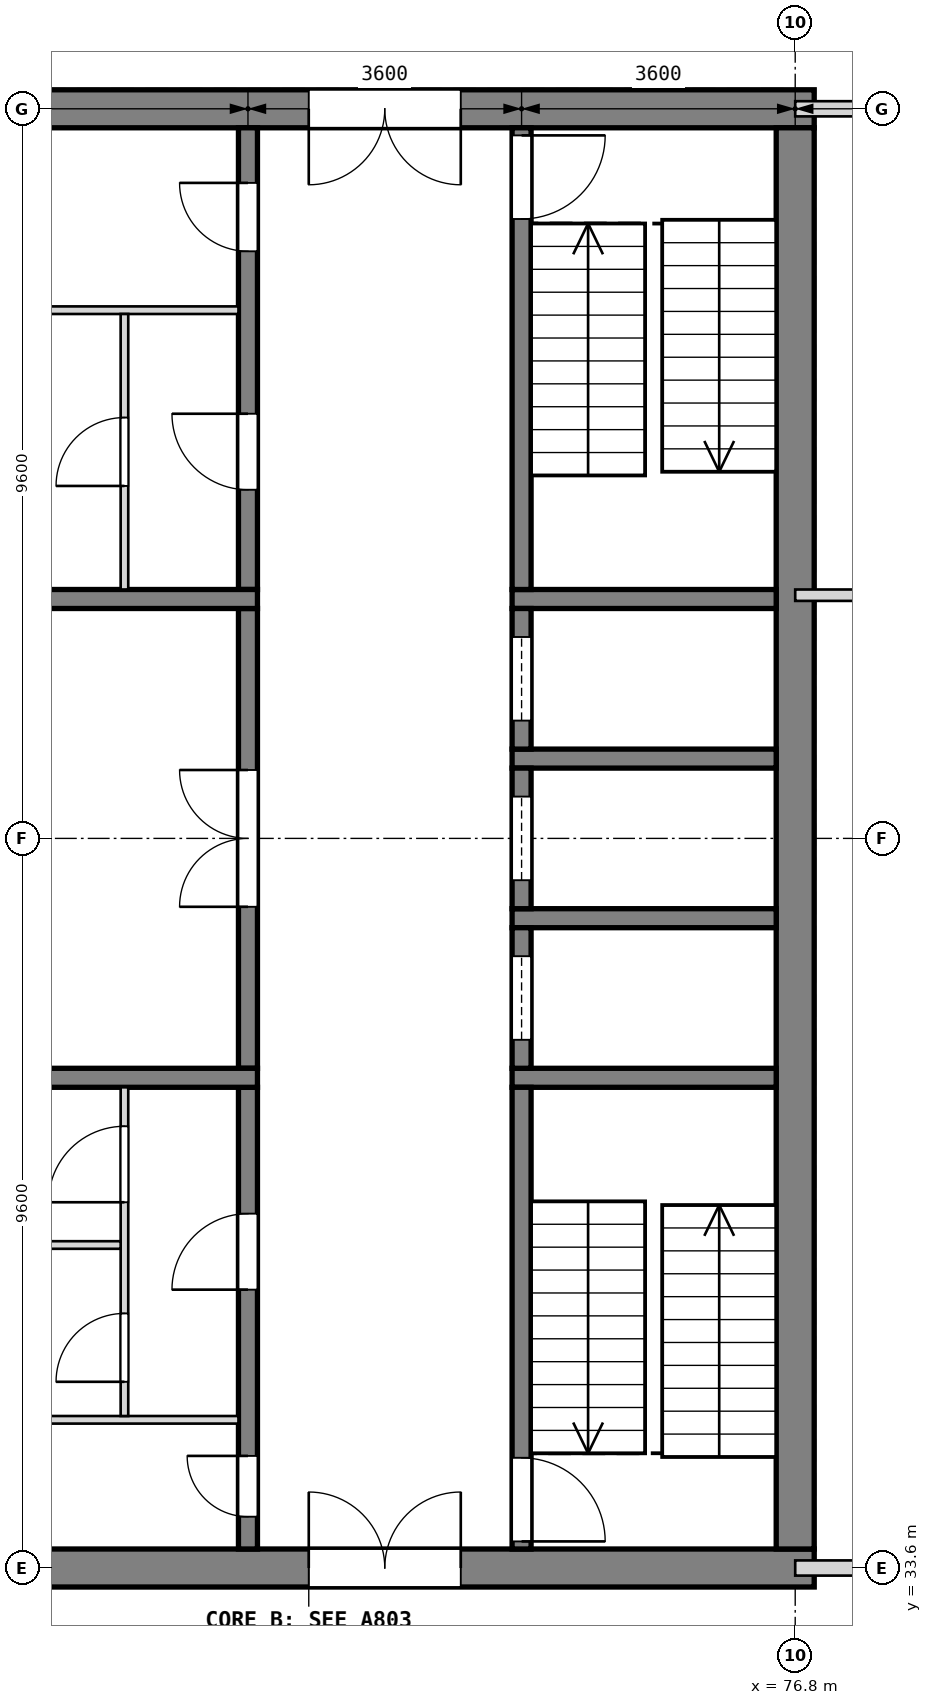
"""IFC4 building model, lengths in metres.
Left out: names, types, materials, properties, quantities, classifications, styles, units other than length and angle.
Written with IfcOpenShell. Run it as: python <this file> out.ifc"""

import sys

from ifc_helpers import new_model, si_unit, direction, frame, frame_2d, origin, place, context, subcontext, project, spatial, rectangle, extrude, element, fill, save


model = new_model("IFC4")
c1 = context("Model", 3, precision=1e-05, world=origin(), true_north=direction((0.0, 1.0)))
c2 = subcontext(c1, "Body", "Model", "MODEL_VIEW")
j1 = project(units=[si_unit("LENGTHUNIT", "METRE"), si_unit("PLANEANGLEUNIT", "RADIAN")], contexts=[c1])
p1 = place(None, origin())
s1 = spatial("IfcSite", under=j1, at=p1, CompositionType="ELEMENT")
p2 = place(p1, origin())
s2 = spatial("IfcBuilding", under=s1, at=p2, CompositionType="ELEMENT")
p3 = place(p2, frame((0.0, 0.0, 4.2)))
s3 = spatial("IfcBuildingStorey", under=s2, at=p3, CompositionType="ELEMENT", Elevation=4.2)
p4 = place(p3, frame((63.75, 52.8, 0.0), z_axis=(0.0, 0.0, 1.0), x_axis=(1.0, 0.0, 0.0)))
e1 = element("IfcWall", 1, at=p4, inside=s3, PredefinedType="SHEAR", context=c2, shape_type="SweptSolid", body=[
    extrude(rectangle(XDim=13.3, YDim=0.5, at=frame_2d((6.65, 0.0))), origin(), (0.0, 0.0, 1.0), 4.2),
])
p5 = place(p4, frame((6.65, 0.0, 0.0)))
e2 = element("IfcOpeningElement", 2, at=p5, cuts=e1, PredefinedType="OPENING", context=c2, shape_type="SweptSolid", body=[
    extrude(rectangle(XDim=2.0, YDim=2.1, at=frame_2d((1.0, 1.05))), frame((0.0, 0.26, 0.0), z_axis=(0.0, -1.0, 0.0), x_axis=(1.0, 0.0, 0.0)), (0.0, 0.0, 1.0), 0.52),
])
p6 = place(p3, frame((63.75, 33.6, 0.0), z_axis=(0.0, 0.0, 1.0), x_axis=(1.0, 0.0, 0.0)))
e3 = element("IfcWall", 3, at=p6, inside=s3, PredefinedType="SHEAR", context=c2, shape_type="SweptSolid", body=[
    extrude(rectangle(XDim=13.3, YDim=0.5, at=frame_2d((6.65, 0.0))), origin(), (0.0, 0.0, 1.0), 4.2),
])
p7 = place(p6, frame((6.65, 0.0, 0.0)))
e4 = element("IfcOpeningElement", 4, at=p7, cuts=e3, PredefinedType="OPENING", context=c2, shape_type="SweptSolid", body=[
    extrude(rectangle(XDim=2.0, YDim=2.1, at=frame_2d((1.0, 1.05))), frame((0.0, 0.26, 0.0), z_axis=(0.0, -1.0, 0.0), x_axis=(1.0, 0.0, 0.0)), (0.0, 0.0, 1.0), 0.52),
])
p8 = place(p3, frame((76.8, 33.85, 0.0), z_axis=(0.0, 0.0, 1.0), x_axis=(0.0, 1.0, 0.0)))
e5 = element("IfcWall", 5, at=p8, inside=s3, PredefinedType="SHEAR", context=c2, shape_type="SweptSolid", body=[
    extrude(rectangle(XDim=18.7, YDim=0.5, at=frame_2d((9.35, 0.0))), origin(), (0.0, 0.0, 1.0), 4.2),
])
for number, where, z_axis, x_axis in (
    (6, (76.55, 40.05, 0.0), (0.0, 0.0, 1.0), (-1.0, 0.0, 0.0)),
    (7, (76.55, 42.15, 0.0), (0.0, 0.0, 1.0), (-1.0, 0.0, 0.0)),
    (8, (76.55, 44.25, 0.0), (0.0, 0.0, 1.0), (-1.0, 0.0, 0.0)),
    (9, (76.55, 46.35, 0.0), (0.0, 0.0, 1.0), (-1.0, 0.0, 0.0)),
):
    element("IfcWall", number, at=place(p3, frame(where, z_axis=z_axis, x_axis=x_axis)), inside=s3, PredefinedType="SOLIDWALL", context=c2, shape_type="SweptSolid", body=[
        extrude(rectangle(XDim=3.475, YDim=0.25, at=frame_2d((1.738, 0.0))), origin(), (0.0, 0.0, 1.0), 3.9),
    ])
p9 = place(p3, frame((73.2, 33.85, 0.0), z_axis=(0.0, 0.0, 1.0), x_axis=(0.0, 1.0, 0.0)))
e10 = element("IfcWall", 10, at=p9, inside=s3, PredefinedType="SOLIDWALL", context=c2, shape_type="SweptSolid", body=[
    extrude(rectangle(XDim=6.075, YDim=0.25, at=frame_2d((3.038, 0.0))), origin(), (0.0, 0.0, 1.0), 3.9),
])
p10 = place(p9, frame((0.1, 0.0, 0.0)))
e11 = element("IfcOpeningElement", 11, at=p10, cuts=e10, PredefinedType="OPENING", context=c2, shape_type="SweptSolid", body=[
    extrude(rectangle(XDim=1.1, YDim=2.1, at=frame_2d((0.55, 1.05))), frame((0.0, 0.135, 0.0), z_axis=(0.0, -1.0, 0.0), x_axis=(1.0, 0.0, 0.0)), (0.0, 0.0, 1.0), 0.27),
])
p11 = place(p3, frame((73.2, 40.175, 0.0), z_axis=(0.0, 0.0, 1.0), x_axis=(0.0, 1.0, 0.0)))
e12 = element("IfcWall", 12, at=p11, inside=s3, PredefinedType="SOLIDWALL", context=c2, shape_type="SweptSolid", body=[
    extrude(rectangle(XDim=1.85, YDim=0.25, at=frame_2d((0.925, 0.0))), origin(), (0.0, 0.0, 1.0), 3.9),
])
p12 = place(p11, frame((0.375, 0.0, 0.0)))
e13 = element("IfcOpeningElement", 13, at=p12, cuts=e12, PredefinedType="OPENING", context=c2, shape_type="SweptSolid", body=[
    extrude(rectangle(XDim=1.1, YDim=2.1, at=frame_2d((0.55, 1.05))), frame((0.0, 0.135, 0.0), z_axis=(0.0, -1.0, 0.0), x_axis=(1.0, 0.0, 0.0)), (0.0, 0.0, 1.0), 0.27),
])
p13 = place(p3, frame((73.2, 42.275, 0.0), z_axis=(0.0, 0.0, 1.0), x_axis=(0.0, 1.0, 0.0)))
e14 = element("IfcWall", 14, at=p13, inside=s3, PredefinedType="SOLIDWALL", context=c2, shape_type="SweptSolid", body=[
    extrude(rectangle(XDim=1.85, YDim=0.25, at=frame_2d((0.925, 0.0))), origin(), (0.0, 0.0, 1.0), 3.9),
])
p14 = place(p13, frame((0.375, 0.0, 0.0)))
e15 = element("IfcOpeningElement", 15, at=p14, cuts=e14, PredefinedType="OPENING", context=c2, shape_type="SweptSolid", body=[
    extrude(rectangle(XDim=1.1, YDim=2.1, at=frame_2d((0.55, 1.05))), frame((0.0, 0.135, 0.0), z_axis=(0.0, -1.0, 0.0), x_axis=(1.0, 0.0, 0.0)), (0.0, 0.0, 1.0), 0.27),
])
p15 = place(p3, frame((73.2, 44.375, 0.0), z_axis=(0.0, 0.0, 1.0), x_axis=(0.0, 1.0, 0.0)))
e16 = element("IfcWall", 16, at=p15, inside=s3, PredefinedType="SOLIDWALL", context=c2, shape_type="SweptSolid", body=[
    extrude(rectangle(XDim=1.85, YDim=0.25, at=frame_2d((0.925, 0.0))), origin(), (0.0, 0.0, 1.0), 3.9),
])
p16 = place(p15, frame((0.375, 0.0, 0.0)))
e17 = element("IfcOpeningElement", 17, at=p16, cuts=e16, PredefinedType="OPENING", context=c2, shape_type="SweptSolid", body=[
    extrude(rectangle(XDim=1.1, YDim=2.1, at=frame_2d((0.55, 1.05))), frame((0.0, 0.135, 0.0), z_axis=(0.0, -1.0, 0.0), x_axis=(1.0, 0.0, 0.0)), (0.0, 0.0, 1.0), 0.27),
])
p17 = place(p3, frame((73.2, 46.475, 0.0), z_axis=(0.0, 0.0, 1.0), x_axis=(0.0, 1.0, 0.0)))
e18 = element("IfcWall", 18, at=p17, inside=s3, PredefinedType="SOLIDWALL", context=c2, shape_type="SweptSolid", body=[
    extrude(rectangle(XDim=6.075, YDim=0.25, at=frame_2d((3.038, 0.0))), origin(), (0.0, 0.0, 1.0), 3.9),
])
p18 = place(p17, frame((4.875, 0.0, 0.0)))
e19 = element("IfcOpeningElement", 19, at=p18, cuts=e18, PredefinedType="OPENING", context=c2, shape_type="SweptSolid", body=[
    extrude(rectangle(XDim=1.1, YDim=2.1, at=frame_2d((0.55, 1.05))), frame((0.0, 0.135, 0.0), z_axis=(0.0, -1.0, 0.0), x_axis=(1.0, 0.0, 0.0)), (0.0, 0.0, 1.0), 0.27),
])
p19 = place(p3, frame((69.6, 33.85, 0.0), z_axis=(0.0, 0.0, 1.0), x_axis=(0.0, 1.0, 0.0)))
e20 = element("IfcWall", 20, at=p19, inside=s3, PredefinedType="SOLIDWALL", context=c2, shape_type="SweptSolid", body=[
    extrude(rectangle(XDim=6.075, YDim=0.25, at=frame_2d((3.038, 0.0))), origin(), (0.0, 0.0, 1.0), 3.9),
])
p20 = place(p19, frame((0.425, 0.0, 0.0)))
e21 = element("IfcOpeningElement", 21, at=p20, cuts=e20, PredefinedType="OPENING", context=c2, shape_type="SweptSolid", body=[
    extrude(rectangle(XDim=0.8, YDim=2.1, at=frame_2d((0.4, 1.05))), frame((0.0, 0.135, 0.0), z_axis=(0.0, -1.0, 0.0), x_axis=(1.0, 0.0, 0.0)), (0.0, 0.0, 1.0), 0.27),
])
p21 = place(p19, frame((3.413, 0.0, 0.0)))
e22 = element("IfcOpeningElement", 22, at=p21, cuts=e20, PredefinedType="OPENING", context=c2, shape_type="SweptSolid", body=[
    extrude(rectangle(XDim=1.0, YDim=2.1, at=frame_2d((0.5, 1.05))), frame((0.0, 0.135, 0.0), z_axis=(0.0, -1.0, 0.0), x_axis=(1.0, 0.0, 0.0)), (0.0, 0.0, 1.0), 0.27),
])
p22 = place(p3, frame((69.6, 40.175, 0.0), z_axis=(0.0, 0.0, 1.0), x_axis=(0.0, 1.0, 0.0)))
e23 = element("IfcWall", 23, at=p22, inside=s3, PredefinedType="SOLIDWALL", context=c2, shape_type="SweptSolid", body=[
    extrude(rectangle(XDim=6.05, YDim=0.25, at=frame_2d((3.025, 0.0))), origin(), (0.0, 0.0, 1.0), 3.9),
])
p23 = place(p22, frame((2.125, 0.0, 0.0)))
e24 = element("IfcOpeningElement", 24, at=p23, cuts=e23, PredefinedType="OPENING", context=c2, shape_type="SweptSolid", body=[
    extrude(rectangle(XDim=1.8, YDim=2.1, at=frame_2d((0.9, 1.05))), frame((0.0, 0.135, 0.0), z_axis=(0.0, -1.0, 0.0), x_axis=(1.0, 0.0, 0.0)), (0.0, 0.0, 1.0), 0.27),
])
p24 = place(p3, frame((69.6, 46.475, 0.0), z_axis=(0.0, 0.0, 1.0), x_axis=(0.0, 1.0, 0.0)))
e25 = element("IfcWall", 25, at=p24, inside=s3, PredefinedType="SOLIDWALL", context=c2, shape_type="SweptSolid", body=[
    extrude(rectangle(XDim=6.075, YDim=0.25, at=frame_2d((3.038, 0.0))), origin(), (0.0, 0.0, 1.0), 3.9),
])
p25 = place(p24, frame((1.312, 0.0, 0.0)))
e26 = element("IfcOpeningElement", 26, at=p25, cuts=e25, PredefinedType="OPENING", context=c2, shape_type="SweptSolid", body=[
    extrude(rectangle(XDim=1.0, YDim=2.1, at=frame_2d((0.5, 1.05))), frame((0.0, 0.135, 0.0), z_axis=(0.0, -1.0, 0.0), x_axis=(1.0, 0.0, 0.0)), (0.0, 0.0, 1.0), 0.27),
])
p26 = place(p24, frame((4.45, 0.0, 0.0)))
e27 = element("IfcOpeningElement", 27, at=p26, cuts=e25, PredefinedType="OPENING", context=c2, shape_type="SweptSolid", body=[
    extrude(rectangle(XDim=0.9, YDim=2.1, at=frame_2d((0.45, 1.05))), frame((0.0, 0.135, 0.0), z_axis=(0.0, -1.0, 0.0), x_axis=(1.0, 0.0, 0.0)), (0.0, 0.0, 1.0), 0.27),
])
for number, where, z_axis, x_axis in (
    (28, (69.725, 40.05, 0.0), (0.0, 0.0, 1.0), (-1.0, 0.0, 0.0)),
    (29, (69.725, 46.35, 0.0), (0.0, 0.0, 1.0), (-1.0, 0.0, 0.0)),
):
    element("IfcWall", number, at=place(p3, frame(where, z_axis=z_axis, x_axis=x_axis)), inside=s3, PredefinedType="SOLIDWALL", context=c2, shape_type="SweptSolid", body=[
        extrude(rectangle(XDim=5.425, YDim=0.25, at=frame_2d((2.712, 0.0))), origin(), (0.0, 0.0, 1.0), 3.9),
    ])
p27 = place(p3, frame((69.475, 35.55, 0.0), z_axis=(0.0, 0.0, 1.0), x_axis=(-1.0, 0.0, 0.0)))
e30 = element("IfcWall", 30, at=p27, inside=s3, PredefinedType="PARTITIONING", context=c2, shape_type="SweptSolid", body=[
    extrude(rectangle(XDim=5.175, YDim=0.1, at=frame_2d((2.587, 0.0))), origin(), (0.0, 0.0, 1.0), 3.9),
])
p28 = place(p3, frame((67.975, 35.6, 0.0), z_axis=(0.0, 0.0, 1.0), x_axis=(0.0, 1.0, 0.0)))
e31 = element("IfcWall", 31, at=p28, inside=s3, PredefinedType="PARTITIONING", context=c2, shape_type="SweptSolid", body=[
    extrude(rectangle(XDim=4.325, YDim=0.1, at=frame_2d((2.163, 0.0))), origin(), (0.0, 0.0, 1.0), 3.9),
])
p29 = place(p28, frame((0.45, 0.0, 0.0)))
e32 = element("IfcOpeningElement", 32, at=p29, cuts=e31, PredefinedType="OPENING", context=c2, shape_type="SweptSolid", body=[
    extrude(rectangle(XDim=0.9, YDim=2.1, at=frame_2d((0.45, 1.05))), frame((0.0, 0.06, 0.0), z_axis=(0.0, -1.0, 0.0), x_axis=(1.0, 0.0, 0.0)), (0.0, 0.0, 1.0), 0.12),
])
p30 = place(p28, frame((2.812, 0.0, 0.0)))
e33 = element("IfcOpeningElement", 33, at=p30, cuts=e31, PredefinedType="OPENING", context=c2, shape_type="SweptSolid", body=[
    extrude(rectangle(XDim=1.0, YDim=2.1, at=frame_2d((0.5, 1.05))), frame((0.0, 0.06, 0.0), z_axis=(0.0, -1.0, 0.0), x_axis=(1.0, 0.0, 0.0)), (0.0, 0.0, 1.0), 0.12),
])
p31 = place(p3, frame((67.925, 37.85, 0.0), z_axis=(0.0, 0.0, 1.0), x_axis=(-1.0, 0.0, 0.0)))
e34 = element("IfcWall", 34, at=p31, inside=s3, PredefinedType="PARTITIONING", context=c2, shape_type="SweptSolid", body=[
    extrude(rectangle(XDim=3.625, YDim=0.1, at=frame_2d((1.812, 0.0))), origin(), (0.0, 0.0, 1.0), 3.9),
])
p32 = place(p3, frame((69.475, 50.15, 0.0), z_axis=(0.0, 0.0, 1.0), x_axis=(-1.0, 0.0, 0.0)))
e35 = element("IfcWall", 35, at=p32, inside=s3, PredefinedType="PARTITIONING", context=c2, shape_type="SweptSolid", body=[
    extrude(rectangle(XDim=5.175, YDim=0.1, at=frame_2d((2.587, 0.0))), origin(), (0.0, 0.0, 1.0), 3.9),
])
p33 = place(p3, frame((67.975, 46.475, 0.0), z_axis=(0.0, 0.0, 1.0), x_axis=(0.0, 1.0, 0.0)))
e36 = element("IfcWall", 36, at=p33, inside=s3, PredefinedType="PARTITIONING", context=c2, shape_type="SweptSolid", body=[
    extrude(rectangle(XDim=3.625, YDim=0.1, at=frame_2d((1.812, 0.0))), origin(), (0.0, 0.0, 1.0), 3.9),
])
p34 = place(p33, frame((1.363, 0.0, 0.0)))
e37 = element("IfcOpeningElement", 37, at=p34, cuts=e36, PredefinedType="OPENING", context=c2, shape_type="SweptSolid", body=[
    extrude(rectangle(XDim=0.9, YDim=2.1, at=frame_2d((0.45, 1.05))), frame((0.0, 0.06, 0.0), z_axis=(0.0, -1.0, 0.0), x_axis=(1.0, 0.0, 0.0)), (0.0, 0.0, 1.0), 0.12),
])
p35 = place(p3, frame((83.2, 33.6, 0.0), z_axis=(0.0, 0.0, 1.0), x_axis=(-1.0, 0.0, 0.0)))
e38 = element("IfcWall", 38, at=p35, inside=s3, PredefinedType="PARTITIONING", context=c2, shape_type="SweptSolid", body=[
    extrude(rectangle(XDim=6.4, YDim=0.2, at=frame_2d((3.2, 0.0))), origin(), (0.0, 0.0, 1.0), 3.9),
])
p36 = place(p35, frame((2.7, 0.0, 0.0)))
e39 = element("IfcOpeningElement", 39, at=p36, cuts=e38, PredefinedType="OPENING", context=c2, shape_type="SweptSolid", body=[
    extrude(rectangle(XDim=1.0, YDim=2.1, at=frame_2d((0.5, 1.05))), frame((0.0, 0.11, 0.0), z_axis=(0.0, -1.0, 0.0), x_axis=(1.0, 0.0, 0.0)), (0.0, 0.0, 1.0), 0.22),
])
p37 = place(p3, frame((83.2, 46.4, 0.0), z_axis=(0.0, 0.0, 1.0), x_axis=(-1.0, 0.0, 0.0)))
e40 = element("IfcWall", 40, at=p37, inside=s3, PredefinedType="PARTITIONING", context=c2, shape_type="SweptSolid", body=[
    extrude(rectangle(XDim=6.4, YDim=0.15, at=frame_2d((3.2, 0.0))), origin(), (0.0, 0.0, 1.0), 3.9),
])
p38 = place(p3, frame((84.875, 52.8, 0.0), z_axis=(0.0, 0.0, 1.0), x_axis=(-1.0, 0.0, 0.0)))
e41 = element("IfcWall", 41, at=p38, inside=s3, PredefinedType="PARTITIONING", context=c2, shape_type="SweptSolid", body=[
    extrude(rectangle(XDim=8.075, YDim=0.2, at=frame_2d((4.038, 0.0))), origin(), (0.0, 0.0, 1.0), 3.9),
])
p39 = place(p38, frame((3.475, 0.0, 0.0)))
e42 = element("IfcOpeningElement", 42, at=p39, cuts=e41, PredefinedType="OPENING", context=c2, shape_type="SweptSolid", body=[
    extrude(rectangle(XDim=1.0, YDim=2.1, at=frame_2d((0.5, 1.05))), frame((0.0, 0.11, 0.0), z_axis=(0.0, -1.0, 0.0), x_axis=(1.0, 0.0, 0.0)), (0.0, 0.0, 1.0), 0.22),
])
p40 = place(p10, frame((1.1, 0.0, 0.0), z_axis=(0.0, 0.0, 1.0), x_axis=(-1.0, 0.0, 0.0)))
e43 = element("IfcDoor", 43, at=p40, inside=s3, OperationType="SINGLE_SWING_RIGHT", PredefinedType="DOOR", context=c2, shape_type="SweptSolid", body=[
    extrude(rectangle(XDim=1.1, YDim=2.1, at=frame_2d((0.55, 1.05))), frame((0.0, 0.025, 0.0), z_axis=(0.0, -1.0, 0.0), x_axis=(1.0, 0.0, 0.0)), (0.0, 0.0, 1.0), 0.05),
])
fill(e11, e43)
p41 = place(p18, frame((1.1, 0.0, 0.0), z_axis=(0.0, 0.0, 1.0), x_axis=(-1.0, 0.0, 0.0)))
e44 = element("IfcDoor", 44, at=p41, inside=s3, OperationType="SINGLE_SWING_LEFT", PredefinedType="DOOR", context=c2, shape_type="SweptSolid", body=[
    extrude(rectangle(XDim=1.1, YDim=2.1, at=frame_2d((0.55, 1.05))), frame((0.0, 0.025, 0.0), z_axis=(0.0, -1.0, 0.0), x_axis=(1.0, 0.0, 0.0)), (0.0, 0.0, 1.0), 0.05),
])
fill(e19, e44)
p42 = place(p12, origin())
e45 = element("IfcDoor", 45, at=p42, inside=s3, OperationType="SLIDING_TO_LEFT", PredefinedType="DOOR", context=c2, shape_type="SweptSolid", body=[
    extrude(rectangle(XDim=1.1, YDim=2.1, at=frame_2d((0.55, 1.05))), frame((0.0, 0.025, 0.0), z_axis=(0.0, -1.0, 0.0), x_axis=(1.0, 0.0, 0.0)), (0.0, 0.0, 1.0), 0.05),
])
fill(e13, e45)
p43 = place(p14, origin())
e46 = element("IfcDoor", 46, at=p43, inside=s3, OperationType="SLIDING_TO_LEFT", PredefinedType="DOOR", context=c2, shape_type="SweptSolid", body=[
    extrude(rectangle(XDim=1.1, YDim=2.1, at=frame_2d((0.55, 1.05))), frame((0.0, 0.025, 0.0), z_axis=(0.0, -1.0, 0.0), x_axis=(1.0, 0.0, 0.0)), (0.0, 0.0, 1.0), 0.05),
])
fill(e15, e46)
p44 = place(p16, origin())
e47 = element("IfcDoor", 47, at=p44, inside=s3, OperationType="SLIDING_TO_LEFT", PredefinedType="DOOR", context=c2, shape_type="SweptSolid", body=[
    extrude(rectangle(XDim=1.1, YDim=2.1, at=frame_2d((0.55, 1.05))), frame((0.0, 0.025, 0.0), z_axis=(0.0, -1.0, 0.0), x_axis=(1.0, 0.0, 0.0)), (0.0, 0.0, 1.0), 0.05),
])
fill(e17, e47)
p45 = place(p23, origin())
e48 = element("IfcDoor", 48, at=p45, inside=s3, OperationType="DOUBLE_DOOR_SINGLE_SWING", PredefinedType="DOOR", context=c2, shape_type="SweptSolid", body=[
    extrude(rectangle(XDim=1.8, YDim=2.1, at=frame_2d((0.9, 1.05))), frame((0.0, 0.025, 0.0), z_axis=(0.0, -1.0, 0.0), x_axis=(1.0, 0.0, 0.0)), (0.0, 0.0, 1.0), 0.05),
])
fill(e24, e48)
p46 = place(p20, origin())
e49 = element("IfcDoor", 49, at=p46, inside=s3, OperationType="SINGLE_SWING_RIGHT", PredefinedType="DOOR", context=c2, shape_type="SweptSolid", body=[
    extrude(rectangle(XDim=0.8, YDim=2.1, at=frame_2d((0.4, 1.05))), frame((0.0, 0.025, 0.0), z_axis=(0.0, -1.0, 0.0), x_axis=(1.0, 0.0, 0.0)), (0.0, 0.0, 1.0), 0.05),
])
fill(e21, e49)
p47 = place(p21, origin())
e50 = element("IfcDoor", 50, at=p47, inside=s3, OperationType="SINGLE_SWING_LEFT", PredefinedType="DOOR", context=c2, shape_type="SweptSolid", body=[
    extrude(rectangle(XDim=1.0, YDim=2.1, at=frame_2d((0.5, 1.05))), frame((0.0, 0.025, 0.0), z_axis=(0.0, -1.0, 0.0), x_axis=(1.0, 0.0, 0.0)), (0.0, 0.0, 1.0), 0.05),
])
fill(e22, e50)
p48 = place(p29, origin())
e51 = element("IfcDoor", 51, at=p48, inside=s3, OperationType="SINGLE_SWING_LEFT", PredefinedType="DOOR", context=c2, shape_type="SweptSolid", body=[
    extrude(rectangle(XDim=0.9, YDim=2.1, at=frame_2d((0.45, 1.05))), frame((0.0, 0.025, 0.0), z_axis=(0.0, -1.0, 0.0), x_axis=(1.0, 0.0, 0.0)), (0.0, 0.0, 1.0), 0.05),
])
fill(e32, e51)
p49 = place(p30, origin())
e52 = element("IfcDoor", 52, at=p49, inside=s3, OperationType="SINGLE_SWING_LEFT", PredefinedType="DOOR", context=c2, shape_type="SweptSolid", body=[
    extrude(rectangle(XDim=1.0, YDim=2.1, at=frame_2d((0.5, 1.05))), frame((0.0, 0.025, 0.0), z_axis=(0.0, -1.0, 0.0), x_axis=(1.0, 0.0, 0.0)), (0.0, 0.0, 1.0), 0.05),
])
fill(e33, e52)
p50 = place(p25, origin())
e53 = element("IfcDoor", 53, at=p50, inside=s3, OperationType="SINGLE_SWING_RIGHT", PredefinedType="DOOR", context=c2, shape_type="SweptSolid", body=[
    extrude(rectangle(XDim=1.0, YDim=2.1, at=frame_2d((0.5, 1.05))), frame((0.0, 0.025, 0.0), z_axis=(0.0, -1.0, 0.0), x_axis=(1.0, 0.0, 0.0)), (0.0, 0.0, 1.0), 0.05),
])
fill(e26, e53)
p51 = place(p34, origin())
e54 = element("IfcDoor", 54, at=p51, inside=s3, OperationType="SINGLE_SWING_LEFT", PredefinedType="DOOR", context=c2, shape_type="SweptSolid", body=[
    extrude(rectangle(XDim=0.9, YDim=2.1, at=frame_2d((0.45, 1.05))), frame((0.0, 0.025, 0.0), z_axis=(0.0, -1.0, 0.0), x_axis=(1.0, 0.0, 0.0)), (0.0, 0.0, 1.0), 0.05),
])
fill(e37, e54)
p52 = place(p26, origin())
e55 = element("IfcDoor", 55, at=p52, inside=s3, OperationType="SINGLE_SWING_RIGHT", PredefinedType="DOOR", context=c2, shape_type="SweptSolid", body=[
    extrude(rectangle(XDim=0.9, YDim=2.1, at=frame_2d((0.45, 1.05))), frame((0.0, 0.025, 0.0), z_axis=(0.0, -1.0, 0.0), x_axis=(1.0, 0.0, 0.0)), (0.0, 0.0, 1.0), 0.05),
])
fill(e27, e55)
p53 = place(p7, origin())
e56 = element("IfcDoor", 56, at=p53, inside=s3, OperationType="DOUBLE_DOOR_SINGLE_SWING", PredefinedType="DOOR", context=c2, shape_type="SweptSolid", body=[
    extrude(rectangle(XDim=2.0, YDim=2.1, at=frame_2d((1.0, 1.05))), frame((0.0, 0.025, 0.0), z_axis=(0.0, -1.0, 0.0), x_axis=(1.0, 0.0, 0.0)), (0.0, 0.0, 1.0), 0.05),
])
fill(e4, e56)
p54 = place(p5, frame((2.0, 0.0, 0.0), z_axis=(0.0, 0.0, 1.0), x_axis=(-1.0, 0.0, 0.0)))
e57 = element("IfcDoor", 57, at=p54, inside=s3, OperationType="DOUBLE_DOOR_SINGLE_SWING", PredefinedType="DOOR", context=c2, shape_type="SweptSolid", body=[
    extrude(rectangle(XDim=2.0, YDim=2.1, at=frame_2d((1.0, 1.05))), frame((0.0, 0.025, 0.0), z_axis=(0.0, -1.0, 0.0), x_axis=(1.0, 0.0, 0.0)), (0.0, 0.0, 1.0), 0.05),
])
fill(e2, e57)
save(model, sys.argv[1])
